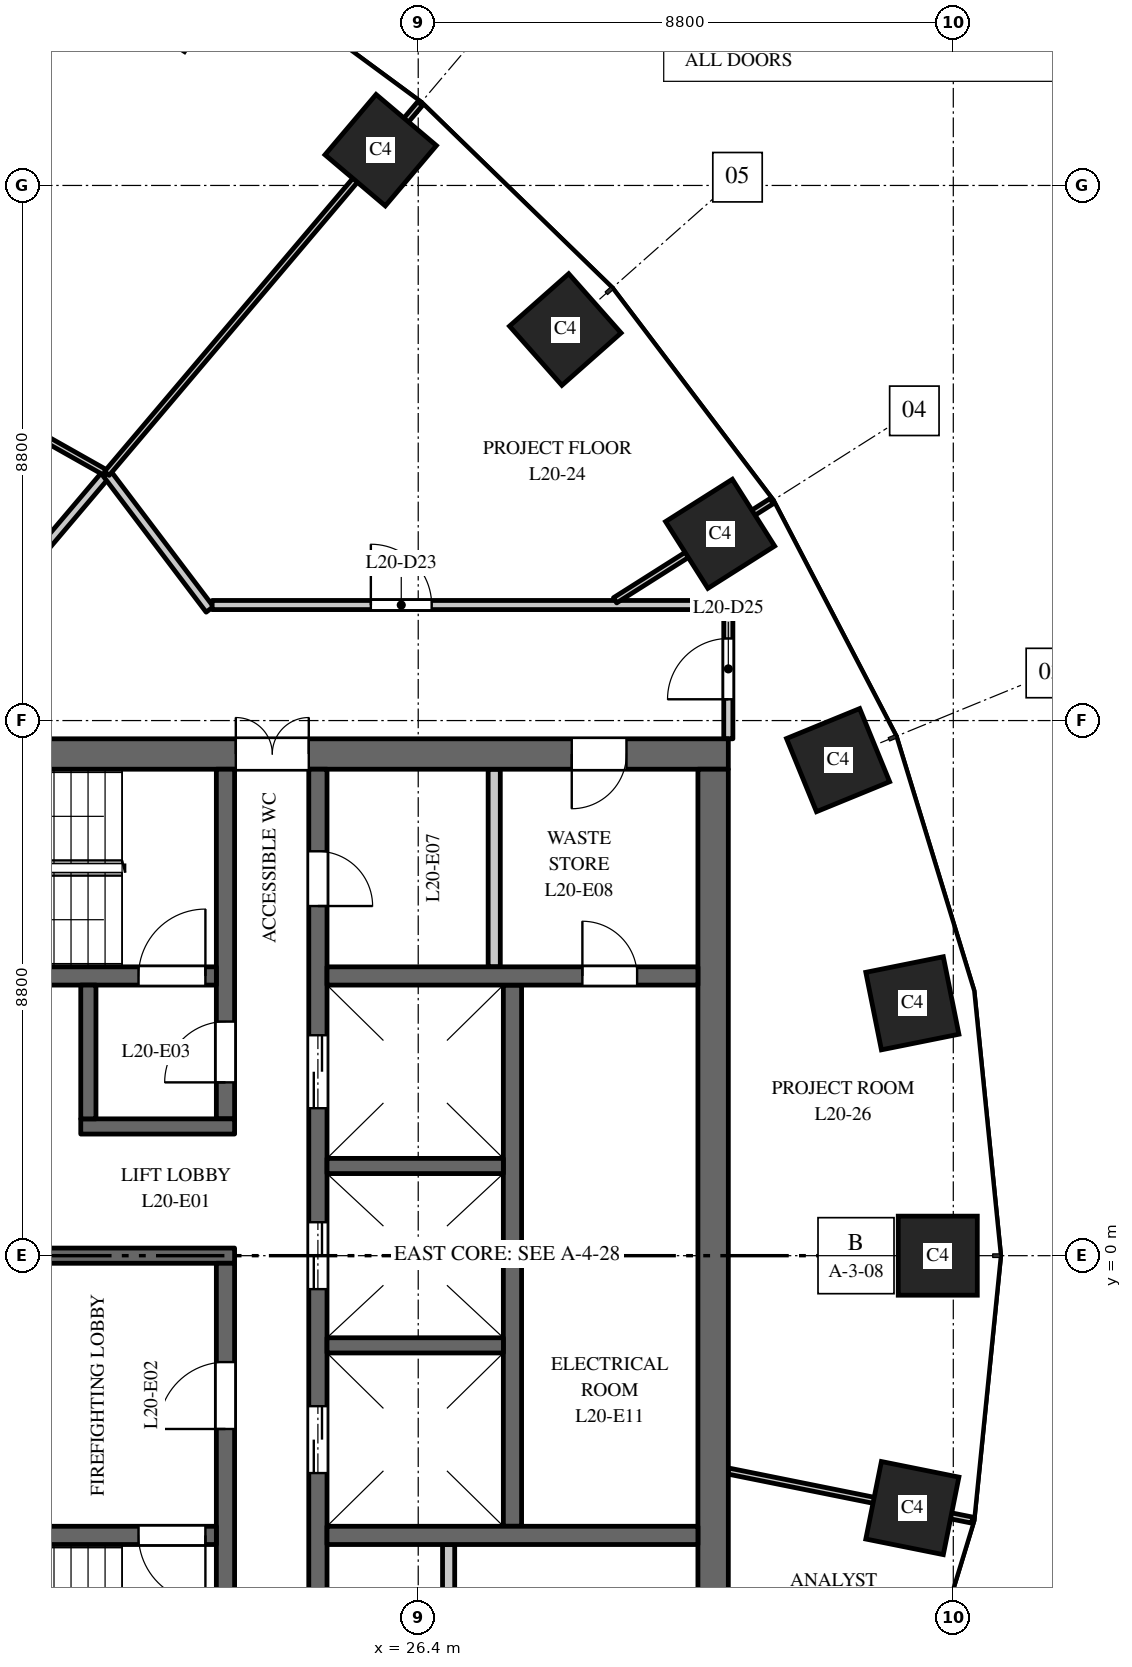
"""IFC4 building model, lengths in metres.
Left out: names, types, materials, properties, quantities, classifications, styles, units other than length and angle.
Written with IfcOpenShell. Run it as: python <this file> out.ifc"""

import sys

from ifc_helpers import new_model, si_unit, direction, frame, frame_2d, origin, origin_2d, place, context, subcontext, project, spatial, rectangle, extrude, element, fill, save


model = new_model("IFC4")
c1 = context("Model", 3, precision=1e-05, world=origin(), true_north=direction((0.0, 1.0)))
c2 = subcontext(c1, "Body", "Model", "MODEL_VIEW")
j1 = project(units=[si_unit("LENGTHUNIT", "METRE"), si_unit("PLANEANGLEUNIT", "RADIAN")], contexts=[c1])
p1 = place(None, origin())
s1 = spatial("IfcSite", under=j1, at=p1, CompositionType="ELEMENT")
p2 = place(p1, origin())
s2 = spatial("IfcBuilding", under=s1, at=p2, CompositionType="ELEMENT")
p3 = place(p2, frame((0.0, 0.0, 92.0)))
s3 = spatial("IfcBuildingStorey", under=s2, at=p3, CompositionType="ELEMENT", Elevation=92.0)
for number, where, z_axis, x_axis in (
    (1, (34.945, 0.0, 0.0), (0.0, 0.0, 1.0), (0.0, 1.0, 0.0)),
    (2, (34.527, 4.151, 0.0), (0.0, 0.0, 1.0), (-0.197, 0.98, 0.0)),
    (3, (33.305, 8.149, 0.0), (0.0, 0.0, 1.0), (-0.379, 0.925, 0.0)),
    (4, (31.365, 11.871, 0.0), (0.0, 0.0, 1.0), (-0.535, 0.845, 0.0)),
    (5, (28.819, 15.23, 0.0), (0.0, 0.0, 1.0), (-0.663, 0.749, 0.0)),
    (6, (25.783, 18.18, 0.0), (0.0, 0.0, 1.0), (-0.763, 0.646, 0.0)),
    (7, (34.527, -4.151, 0.0), (0.0, 0.0, 1.0), (0.197, 0.98, 0.0)),
):
    element("IfcColumn", number, at=place(p3, frame(where, z_axis=z_axis, x_axis=x_axis)), inside=s3, PredefinedType="COLUMN", context=c2, shape_type="SweptSolid", body=[
        extrude(rectangle(XDim=1.3, YDim=1.3, at=origin_2d()), origin(), (0.0, 0.0, 1.0), 4.0),
    ])
p4 = place(p3, frame((16.5, 8.25, 0.0), z_axis=(0.0, 0.0, 1.0), x_axis=(1.0, 0.0, 0.0)))
e8 = element("IfcWall", 8, at=p4, inside=s3, PredefinedType="SHEAR", context=c2, shape_type="SweptSolid", body=[
    extrude(rectangle(XDim=15.0, YDim=0.5, at=frame_2d((7.5, 0.0))), origin(), (0.0, 0.0, 1.0), 3.7),
])
p5 = place(p4, frame((6.9, 0.0, 0.0)))
e9 = element("IfcOpeningElement", 9, at=p5, cuts=e8, PredefinedType="OPENING", context=c2, shape_type="SweptSolid", body=[
    extrude(rectangle(XDim=1.2, YDim=2.1, at=frame_2d((0.6, 1.05))), frame((0.0, 0.26, 0.0), z_axis=(0.0, -1.0, 0.0), x_axis=(1.0, 0.0, 0.0)), (0.0, 0.0, 1.0), 0.52),
])
p6 = place(p4, frame((12.425, 0.0, 0.0)))
e10 = element("IfcOpeningElement", 10, at=p6, cuts=e8, PredefinedType="OPENING", context=c2, shape_type="SweptSolid", body=[
    extrude(rectangle(XDim=0.9, YDim=2.1, at=frame_2d((0.45, 1.05))), frame((0.0, 0.26, 0.0), z_axis=(0.0, -1.0, 0.0), x_axis=(1.0, 0.0, 0.0)), (0.0, 0.0, 1.0), 0.52),
])
p7 = place(p3, frame((27.95, -4.45, 0.0), z_axis=(0.0, 0.0, 1.0), x_axis=(0.0, 1.0, 0.0)))
e11 = element("IfcWall", 11, at=p7, inside=s3, PredefinedType="SHEAR", context=c2, shape_type="SweptSolid", body=[
    extrude(rectangle(XDim=8.9, YDim=0.3, at=frame_2d((4.45, 0.0))), origin(), (0.0, 0.0, 1.0), 3.7),
])
p8 = place(p3, frame((24.75, -8.0, 0.0), z_axis=(0.0, 0.0, 1.0), x_axis=(0.0, 1.0, 0.0)))
e12 = element("IfcWall", 12, at=p8, inside=s3, PredefinedType="SHEAR", context=c2, shape_type="SweptSolid", body=[
    extrude(rectangle(XDim=16.0, YDim=0.3, at=frame_2d((8.0, 0.0))), origin(), (0.0, 0.0, 1.0), 3.7),
])
p9 = place(p8, frame((4.425, 0.0, 0.0)))
e13 = element("IfcOpeningElement", 13, at=p9, cuts=e12, PredefinedType="OPENING", context=c2, shape_type="SweptSolid", body=[
    extrude(rectangle(XDim=1.1, YDim=2.1, at=frame_2d((0.55, 1.05))), frame((0.0, 0.16, 0.0), z_axis=(0.0, -1.0, 0.0), x_axis=(1.0, 0.0, 0.0)), (0.0, 0.0, 1.0), 0.32),
])
p10 = place(p8, frame((7.45, 0.0, 0.0)))
e14 = element("IfcOpeningElement", 14, at=p10, cuts=e12, PredefinedType="OPENING", context=c2, shape_type="SweptSolid", body=[
    extrude(rectangle(XDim=1.1, YDim=2.1, at=frame_2d((0.55, 1.05))), frame((0.0, 0.16, 0.0), z_axis=(0.0, -1.0, 0.0), x_axis=(1.0, 0.0, 0.0)), (0.0, 0.0, 1.0), 0.32),
])
p11 = place(p8, frame((10.425, 0.0, 0.0)))
e15 = element("IfcOpeningElement", 15, at=p11, cuts=e12, PredefinedType="OPENING", context=c2, shape_type="SweptSolid", body=[
    extrude(rectangle(XDim=1.2, YDim=2.1, at=frame_2d((0.6, 1.05))), frame((0.0, 0.16, 0.0), z_axis=(0.0, -1.0, 0.0), x_axis=(1.0, 0.0, 0.0)), (0.0, 0.0, 1.0), 0.32),
])
p12 = place(p8, frame((13.75, 0.0, 0.0)))
e16 = element("IfcOpeningElement", 16, at=p12, cuts=e12, PredefinedType="OPENING", context=c2, shape_type="SweptSolid", body=[
    extrude(rectangle(XDim=0.9, YDim=2.1, at=frame_2d((0.45, 1.05))), frame((0.0, 0.16, 0.0), z_axis=(0.0, -1.0, 0.0), x_axis=(1.0, 0.0, 0.0)), (0.0, 0.0, 1.0), 0.32),
])
p13 = place(p8, frame((1.35, 0.0, 0.0)))
e17 = element("IfcOpeningElement", 17, at=p13, cuts=e12, PredefinedType="OPENING", context=c2, shape_type="SweptSolid", body=[
    extrude(rectangle(XDim=0.9, YDim=2.1, at=frame_2d((0.45, 1.05))), frame((0.0, 0.16, 0.0), z_axis=(0.0, -1.0, 0.0), x_axis=(1.0, 0.0, 0.0)), (0.0, 0.0, 1.0), 0.32),
])
p14 = place(p3, frame((20.1, 0.0, 0.0), z_axis=(0.0, 0.0, 1.0), x_axis=(1.0, 0.0, 0.0)))
e18 = element("IfcWall", 18, at=p14, inside=s3, PredefinedType="SHEAR", context=c2, shape_type="SweptSolid", body=[
    extrude(rectangle(XDim=3.28, YDim=0.25, at=frame_2d((1.64, 0.0))), origin(), (0.0, 0.0, 1.0), 3.7),
])
p15 = place(p3, frame((31.25, -8.0, 0.0), z_axis=(0.0, 0.0, 1.0), x_axis=(0.0, 1.0, 0.0)))
e19 = element("IfcWall", 19, at=p15, inside=s3, PredefinedType="SHEAR", context=c2, shape_type="SweptSolid", body=[
    extrude(rectangle(XDim=16.0, YDim=0.5, at=frame_2d((8.0, 0.0))), origin(), (0.0, 0.0, 1.0), 3.7),
])
p16 = place(p3, frame((24.9, 4.6, 0.0), z_axis=(0.0, 0.0, 1.0), x_axis=(1.0, 0.0, 0.0)))
e20 = element("IfcWall", 20, at=p16, inside=s3, PredefinedType="SHEAR", context=c2, shape_type="SweptSolid", body=[
    extrude(rectangle(XDim=6.1, YDim=0.3, at=frame_2d((3.05, 0.0))), origin(), (0.0, 0.0, 1.0), 3.7),
])
p17 = place(p16, frame((4.2, 0.0, 0.0)))
e21 = element("IfcOpeningElement", 21, at=p17, cuts=e20, PredefinedType="OPENING", context=c2, shape_type="SweptSolid", body=[
    extrude(rectangle(XDim=0.9, YDim=2.1, at=frame_2d((0.45, 1.05))), frame((0.0, 0.16, 0.0), z_axis=(0.0, -1.0, 0.0), x_axis=(1.0, 0.0, 0.0)), (0.0, 0.0, 1.0), 0.32),
])
for number, where, z_axis, x_axis in (
    (22, (27.65, 4.75, 0.0), (0.0, 0.0, 1.0), (0.0, 1.0, 0.0)),
    (23, (26.9, -8.0, 0.0), (0.0, 0.0, 1.0), (0.0, 1.0, 0.0)),
):
    element("IfcWall", number, at=place(p3, frame(where, z_axis=z_axis, x_axis=x_axis)), inside=s3, PredefinedType="PARTITIONING", context=c2, shape_type="SweptSolid", body=[
        extrude(rectangle(XDim=3.25, YDim=0.2, at=frame_2d((1.625, 0.0))), origin(), (0.0, 0.0, 1.0), 3.7),
    ])
p18 = place(p3, frame((24.9, -4.6, 0.0), z_axis=(0.0, 0.0, 1.0), x_axis=(1.0, 0.0, 0.0)))
e24 = element("IfcWall", 24, at=p18, inside=s3, PredefinedType="SHEAR", context=c2, shape_type="SweptSolid", body=[
    extrude(rectangle(XDim=6.1, YDim=0.3, at=frame_2d((3.05, 0.0))), origin(), (0.0, 0.0, 1.0), 3.7),
])
for number, where, z_axis, x_axis in (
    (25, (24.9, -1.475, 0.0), (0.0, 0.0, 1.0), (1.0, 0.0, 0.0)),
    (26, (24.9, 1.475, 0.0), (0.0, 0.0, 1.0), (1.0, 0.0, 0.0)),
):
    element("IfcWall", number, at=place(p3, frame(where, z_axis=z_axis, x_axis=x_axis)), inside=s3, PredefinedType="SHEAR", context=c2, shape_type="SweptSolid", body=[
        extrude(rectangle(XDim=2.9, YDim=0.25, at=frame_2d((1.45, 0.0))), origin(), (0.0, 0.0, 1.0), 3.7),
    ])
p19 = place(p3, frame((23.23, 2.25, 0.0), z_axis=(0.0, 0.0, 1.0), x_axis=(0.0, 1.0, 0.0)))
e27 = element("IfcWall", 27, at=p19, inside=s3, PredefinedType="SHEAR", context=c2, shape_type="SweptSolid", body=[
    extrude(rectangle(XDim=5.75, YDim=0.3, at=frame_2d((2.875, 0.0))), origin(), (0.0, 0.0, 1.0), 3.7),
])
p20 = place(p19, frame((0.6, 0.0, 0.0)))
e28 = element("IfcOpeningElement", 28, at=p20, cuts=e27, PredefinedType="OPENING", context=c2, shape_type="SweptSolid", body=[
    extrude(rectangle(XDim=1.0, YDim=2.1, at=frame_2d((0.5, 1.05))), frame((0.0, 0.16, 0.0), z_axis=(0.0, -1.0, 0.0), x_axis=(1.0, 0.0, 0.0)), (0.0, 0.0, 1.0), 0.32),
])
p21 = place(p3, frame((23.23, -8.0, 0.0), z_axis=(0.0, 0.0, 1.0), x_axis=(0.0, 1.0, 0.0)))
e29 = element("IfcWall", 29, at=p21, inside=s3, PredefinedType="SHEAR", context=c2, shape_type="SweptSolid", body=[
    extrude(rectangle(XDim=7.875, YDim=0.3, at=frame_2d((3.938, 0.0))), origin(), (0.0, 0.0, 1.0), 3.7),
])
p22 = place(p21, frame((5.15, 0.0, 0.0)))
e30 = element("IfcOpeningElement", 30, at=p22, cuts=e29, PredefinedType="OPENING", context=c2, shape_type="SweptSolid", body=[
    extrude(rectangle(XDim=1.1, YDim=2.1, at=frame_2d((0.55, 1.05))), frame((0.0, 0.16, 0.0), z_axis=(0.0, -1.0, 0.0), x_axis=(1.0, 0.0, 0.0)), (0.0, 0.0, 1.0), 0.32),
])
p23 = place(p3, frame((16.9, 4.6, 0.0), z_axis=(0.0, 0.0, 1.0), x_axis=(1.0, 0.0, 0.0)))
e31 = element("IfcWall", 31, at=p23, inside=s3, PredefinedType="SHEAR", context=c2, shape_type="SweptSolid", body=[
    extrude(rectangle(XDim=6.18, YDim=0.3, at=frame_2d((3.09, 0.0))), origin(), (0.0, 0.0, 1.0), 3.7),
])
p24 = place(p23, frame((4.9, 0.0, 0.0)))
e32 = element("IfcOpeningElement", 32, at=p24, cuts=e31, PredefinedType="OPENING", context=c2, shape_type="SweptSolid", body=[
    extrude(rectangle(XDim=1.1, YDim=2.1, at=frame_2d((0.55, 1.05))), frame((0.0, 0.16, 0.0), z_axis=(0.0, -1.0, 0.0), x_axis=(1.0, 0.0, 0.0)), (0.0, 0.0, 1.0), 0.32),
])
p25 = place(p3, frame((16.9, -4.6, 0.0), z_axis=(0.0, 0.0, 1.0), x_axis=(1.0, 0.0, 0.0)))
e33 = element("IfcWall", 33, at=p25, inside=s3, PredefinedType="SHEAR", context=c2, shape_type="SweptSolid", body=[
    extrude(rectangle(XDim=6.18, YDim=0.3, at=frame_2d((3.09, 0.0))), origin(), (0.0, 0.0, 1.0), 3.7),
])
p26 = place(p25, frame((4.9, 0.0, 0.0)))
e34 = element("IfcOpeningElement", 34, at=p26, cuts=e33, PredefinedType="OPENING", context=c2, shape_type="SweptSolid", body=[
    extrude(rectangle(XDim=1.1, YDim=2.1, at=frame_2d((0.55, 1.05))), frame((0.0, 0.16, 0.0), z_axis=(0.0, -1.0, 0.0), x_axis=(1.0, 0.0, 0.0)), (0.0, 0.0, 1.0), 0.32),
])
p27 = place(p3, frame((20.85, 2.125, 0.0), z_axis=(0.0, 0.0, 1.0), x_axis=(1.0, 0.0, 0.0)))
e35 = element("IfcWall", 35, at=p27, inside=s3, PredefinedType="SHEAR", context=c2, shape_type="SweptSolid", body=[
    extrude(rectangle(XDim=2.53, YDim=0.25, at=frame_2d((1.265, 0.0))), origin(), (0.0, 0.0, 1.0), 3.7),
])
p28 = place(p3, frame((20.975, 2.25, 0.0), z_axis=(0.0, 0.0, 1.0), x_axis=(0.0, 1.0, 0.0)))
e36 = element("IfcWall", 36, at=p28, inside=s3, PredefinedType="SHEAR", context=c2, shape_type="SweptSolid", body=[
    extrude(rectangle(XDim=2.2, YDim=0.25, at=frame_2d((1.1, 0.0))), origin(), (0.0, 0.0, 1.0), 3.7),
])
p29 = place(p3, frame((19.511, 10.778, 0.0), z_axis=(0.0, 0.0, 1.0), x_axis=(0.64641426768, 0.762986628021, 0.0)))
e37 = element("IfcWall", 37, at=p29, inside=s3, PredefinedType="PARTITIONING", context=c2, shape_type="SweptSolid", body=[
    extrude(rectangle(XDim=2.735, YDim=0.15, at=frame_2d((1.368, 0.0))), origin(), (0.0, 0.0, 1.0), 3.7),
])
p30 = place(p3, frame((19.969, 13.604, 0.0), z_axis=(0.0, 0.0, 1.0), x_axis=(0.870976686736, -0.491324344158, 0.0)))
e38 = element("IfcWall", 38, at=p30, inside=s3, PredefinedType="PARTITIONING", context=c2, shape_type="SweptSolid", body=[
    extrude(rectangle(XDim=1.504, YDim=0.1, at=frame_2d((0.752, 0.0))), origin(), (0.0, 0.0, 1.0), 3.7),
])
p31 = place(p3, frame((21.279, 12.865, 0.0), z_axis=(0.0, 0.0, 1.0), x_axis=(0.603433696796, -0.797413176196, 0.0)))
e39 = element("IfcWall", 39, at=p31, inside=s3, PredefinedType="PARTITIONING", context=c2, shape_type="SweptSolid", body=[
    extrude(rectangle(XDim=2.805, YDim=0.15, at=frame_2d((1.403, 0.0))), origin(), (0.0, 0.0, 1.0), 2.75),
])
p32 = place(p3, frame((21.279, 12.865, 0.0), z_axis=(0.0, 0.0, 1.0), x_axis=(0.646395355102, 0.763002650652, 0.0)))
e40 = element("IfcWall", 40, at=p32, inside=s3, PredefinedType="PARTITIONING", context=c2, shape_type="SweptSolid", body=[
    extrude(rectangle(XDim=7.969, YDim=0.1, at=frame_2d((3.984, 0.0))), origin(), (0.0, 0.0, 1.0), 2.9),
])
p33 = place(p3, frame((23.011, 10.7, 0.0), z_axis=(0.0, 0.0, 1.0), x_axis=(1.0, 0.0, 0.0)))
e41 = element("IfcWall", 41, at=p33, inside=s3, PredefinedType="PARTITIONING", context=c2, shape_type="SweptSolid", body=[
    extrude(rectangle(XDim=8.489, YDim=0.15, at=frame_2d((4.245, 0.0))), origin(), (0.0, 0.0, 1.0), 2.9),
])
p34 = place(p33, frame((2.61, 0.0, 0.0)))
e42 = element("IfcOpeningElement", 42, at=p34, cuts=e41, PredefinedType="OPENING", context=c2, shape_type="SweptSolid", body=[
    extrude(rectangle(XDim=1.0, YDim=2.1, at=frame_2d((0.5, 1.05))), frame((0.0, 0.085, 0.0), z_axis=(0.0, -1.0, 0.0), x_axis=(1.0, 0.0, 0.0)), (0.0, 0.0, 1.0), 0.17),
])
p35 = place(p3, frame((29.637, 10.777, 0.0), z_axis=(0.0, 0.0, 1.0), x_axis=(0.844810627195, 0.535065420467, 0.0)))
e43 = element("IfcWall", 43, at=p35, inside=s3, PredefinedType="PARTITIONING", context=c2, shape_type="SweptSolid", body=[
    extrude(rectangle(XDim=3.048, YDim=0.1, at=frame_2d((1.524, 0.0))), origin(), (0.0, 0.0, 1.0), 2.9),
])
p36 = place(p3, frame((31.5, -3.542, 0.0), z_axis=(0.0, 0.0, 1.0), x_axis=(0.980357474535, -0.197228857227, 0.0)))
e44 = element("IfcWall", 44, at=p36, inside=s3, PredefinedType="PARTITIONING", context=c2, shape_type="SweptSolid", body=[
    extrude(rectangle(XDim=4.092, YDim=0.1, at=frame_2d((2.046, 0.0))), origin(), (0.0, 0.0, 1.0), 2.9),
])
p37 = place(p3, frame((31.5, 8.5, 0.0), z_axis=(0.0, 0.0, 1.0), x_axis=(0.0, 1.0, 0.0)))
e45 = element("IfcWall", 45, at=p37, inside=s3, PredefinedType="PARTITIONING", context=c2, shape_type="SweptSolid", body=[
    extrude(rectangle(XDim=2.2, YDim=0.15, at=frame_2d((1.1, 0.0))), origin(), (0.0, 0.0, 1.0), 2.9),
])
p38 = place(p37, frame((0.65, 0.0, 0.0)))
e46 = element("IfcOpeningElement", 46, at=p38, cuts=e45, PredefinedType="OPENING", context=c2, shape_type="SweptSolid", body=[
    extrude(rectangle(XDim=1.0, YDim=2.1, at=frame_2d((0.5, 1.05))), frame((0.0, 0.085, 0.0), z_axis=(0.0, -1.0, 0.0), x_axis=(1.0, 0.0, 0.0)), (0.0, 0.0, 1.0), 0.17),
])
p39 = place(p9, origin())
e47 = element("IfcDoor", 47, at=p39, inside=s3, OperationType="DOUBLE_DOOR_SLIDING", PredefinedType="DOOR", context=c2, shape_type="SweptSolid", body=[
    extrude(rectangle(XDim=1.1, YDim=2.1, at=frame_2d((0.55, 1.05))), frame((0.0, 0.025, 0.0), z_axis=(0.0, -1.0, 0.0), x_axis=(1.0, 0.0, 0.0)), (0.0, 0.0, 1.0), 0.05),
])
fill(e13, e47)
p40 = place(p10, origin())
e48 = element("IfcDoor", 48, at=p40, inside=s3, OperationType="DOUBLE_DOOR_SLIDING", PredefinedType="DOOR", context=c2, shape_type="SweptSolid", body=[
    extrude(rectangle(XDim=1.1, YDim=2.1, at=frame_2d((0.55, 1.05))), frame((0.0, 0.025, 0.0), z_axis=(0.0, -1.0, 0.0), x_axis=(1.0, 0.0, 0.0)), (0.0, 0.0, 1.0), 0.05),
])
fill(e14, e48)
p41 = place(p11, origin())
e49 = element("IfcDoor", 49, at=p41, inside=s3, OperationType="DOUBLE_DOOR_SLIDING", PredefinedType="DOOR", context=c2, shape_type="SweptSolid", body=[
    extrude(rectangle(XDim=1.2, YDim=2.1, at=frame_2d((0.6, 1.05))), frame((0.0, 0.025, 0.0), z_axis=(0.0, -1.0, 0.0), x_axis=(1.0, 0.0, 0.0)), (0.0, 0.0, 1.0), 0.05),
])
fill(e15, e49)
p42 = place(p24, origin())
e50 = element("IfcDoor", 50, at=p42, inside=s3, OperationType="SINGLE_SWING_LEFT", PredefinedType="DOOR", context=c2, shape_type="SweptSolid", body=[
    extrude(rectangle(XDim=1.1, YDim=2.1, at=frame_2d((0.55, 1.05))), frame((0.0, 0.025, 0.0), z_axis=(0.0, -1.0, 0.0), x_axis=(1.0, 0.0, 0.0)), (0.0, 0.0, 1.0), 0.05),
])
fill(e32, e50)
p43 = place(p26, origin())
e51 = element("IfcDoor", 51, at=p43, inside=s3, OperationType="SINGLE_SWING_RIGHT", PredefinedType="DOOR", context=c2, shape_type="SweptSolid", body=[
    extrude(rectangle(XDim=1.1, YDim=2.1, at=frame_2d((0.55, 1.05))), frame((0.0, 0.025, 0.0), z_axis=(0.0, -1.0, 0.0), x_axis=(1.0, 0.0, 0.0)), (0.0, 0.0, 1.0), 0.05),
])
fill(e34, e51)
p44 = place(p22, origin())
e52 = element("IfcDoor", 52, at=p44, inside=s3, OperationType="SINGLE_SWING_RIGHT", PredefinedType="DOOR", context=c2, shape_type="SweptSolid", body=[
    extrude(rectangle(XDim=1.1, YDim=2.1, at=frame_2d((0.55, 1.05))), frame((0.0, 0.025, 0.0), z_axis=(0.0, -1.0, 0.0), x_axis=(1.0, 0.0, 0.0)), (0.0, 0.0, 1.0), 0.05),
])
fill(e30, e52)
p45 = place(p20, origin())
e53 = element("IfcDoor", 53, at=p45, inside=s3, OperationType="SINGLE_SWING_RIGHT", PredefinedType="DOOR", context=c2, shape_type="SweptSolid", body=[
    extrude(rectangle(XDim=1.0, YDim=2.1, at=frame_2d((0.5, 1.05))), frame((0.0, 0.025, 0.0), z_axis=(0.0, -1.0, 0.0), x_axis=(1.0, 0.0, 0.0)), (0.0, 0.0, 1.0), 0.05),
])
fill(e28, e53)
p46 = place(p5, origin())
e54 = element("IfcDoor", 54, at=p46, inside=s3, OperationType="DOUBLE_DOOR_DOUBLE_SWING", PredefinedType="DOOR", context=c2, shape_type="SweptSolid", body=[
    extrude(rectangle(XDim=1.2, YDim=2.1, at=frame_2d((0.6, 1.05))), frame((0.0, 0.025, 0.0), z_axis=(0.0, -1.0, 0.0), x_axis=(1.0, 0.0, 0.0)), (0.0, 0.0, 1.0), 0.05),
])
fill(e9, e54)
p47 = place(p12, origin())
e55 = element("IfcDoor", 55, at=p47, inside=s3, OperationType="SINGLE_SWING_LEFT", PredefinedType="DOOR", context=c2, shape_type="SweptSolid", body=[
    extrude(rectangle(XDim=0.9, YDim=2.1, at=frame_2d((0.45, 1.05))), frame((0.0, 0.025, 0.0), z_axis=(0.0, -1.0, 0.0), x_axis=(1.0, 0.0, 0.0)), (0.0, 0.0, 1.0), 0.05),
])
fill(e16, e55)
p48 = place(p6, origin())
e56 = element("IfcDoor", 56, at=p48, inside=s3, OperationType="SINGLE_SWING_LEFT", PredefinedType="DOOR", context=c2, shape_type="SweptSolid", body=[
    extrude(rectangle(XDim=0.9, YDim=2.1, at=frame_2d((0.45, 1.05))), frame((0.0, 0.025, 0.0), z_axis=(0.0, -1.0, 0.0), x_axis=(1.0, 0.0, 0.0)), (0.0, 0.0, 1.0), 0.05),
])
fill(e10, e56)
p49 = place(p17, origin())
e57 = element("IfcDoor", 57, at=p49, inside=s3, OperationType="SINGLE_SWING_RIGHT", PredefinedType="DOOR", context=c2, shape_type="SweptSolid", body=[
    extrude(rectangle(XDim=0.9, YDim=2.1, at=frame_2d((0.45, 1.05))), frame((0.0, 0.025, 0.0), z_axis=(0.0, -1.0, 0.0), x_axis=(1.0, 0.0, 0.0)), (0.0, 0.0, 1.0), 0.05),
])
fill(e21, e57)
p50 = place(p34, origin())
e58 = element("IfcDoor", 58, at=p50, inside=s3, OperationType="SINGLE_SWING_LEFT", PredefinedType="DOOR", context=c2, shape_type="SweptSolid", body=[
    extrude(rectangle(XDim=1.0, YDim=2.1, at=frame_2d((0.5, 1.05))), frame((0.0, 0.025, 0.0), z_axis=(0.0, -1.0, 0.0), x_axis=(1.0, 0.0, 0.0)), (0.0, 0.0, 1.0), 0.05),
])
fill(e42, e58)
p51 = place(p38, origin())
e59 = element("IfcDoor", 59, at=p51, inside=s3, OperationType="SINGLE_SWING_LEFT", PredefinedType="DOOR", context=c2, shape_type="SweptSolid", body=[
    extrude(rectangle(XDim=1.0, YDim=2.1, at=frame_2d((0.5, 1.05))), frame((0.0, 0.025, 0.0), z_axis=(0.0, -1.0, 0.0), x_axis=(1.0, 0.0, 0.0)), (0.0, 0.0, 1.0), 0.05),
])
fill(e46, e59)
save(model, sys.argv[1])
